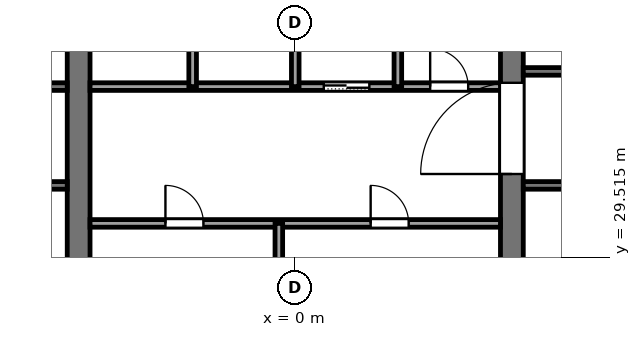
"""IFC4 building model, lengths in metres.
Left out: names, types, materials, properties, quantities, classifications, styles, units other than length and angle.
Written with IfcOpenShell. Run it as: python <this file> out.ifc"""

import sys

from ifc_helpers import new_model, si_unit, direction, frame, frame_2d, origin, place, context, subcontext, project, spatial, rectangle, extrude, element, fill, save


model = new_model("IFC4")
c1 = context("Model", 3, precision=1e-05, world=origin(), true_north=direction((0.0, 1.0)))
c2 = subcontext(c1, "Body", "Model", "MODEL_VIEW")
j1 = project(units=[si_unit("LENGTHUNIT", "METRE"), si_unit("PLANEANGLEUNIT", "RADIAN")], contexts=[c1])
p1 = place(None, origin())
s1 = spatial("IfcSite", under=j1, at=p1, CompositionType="ELEMENT")
p2 = place(p1, origin())
s2 = spatial("IfcBuilding", under=s1, at=p2, CompositionType="ELEMENT")
p3 = place(p2, frame((0.0, 0.0, 202.0)))
s3 = spatial("IfcBuildingStorey", under=s2, at=p3, CompositionType="ELEMENT", Elevation=202.0)
p4 = place(p3, frame((-5.7, 18.4, -0.13), z_axis=(0.0, 0.0, 1.0), x_axis=(0.0, 1.0, 0.0)))
e1 = element("IfcWall", 1, at=p4, inside=s3, PredefinedType="SHEAR", context=c2, shape_type="SweptSolid", body=[
    extrude(rectangle(XDim=19.2, YDim=0.6, at=frame_2d((9.6, 0.0))), origin(), (0.0, 0.0, 1.0), 4.0),
])
p5 = place(p4, frame((8.35, 0.0, 0.13)))
e2 = element("IfcOpeningElement", 2, at=p5, cuts=e1, PredefinedType="OPENING", context=c2, shape_type="SweptSolid", body=[
    extrude(rectangle(XDim=0.9, YDim=2.1, at=frame_2d((0.45, 1.05))), frame((0.0, 0.31, 0.0), z_axis=(0.0, -1.0, 0.0), x_axis=(1.0, 0.0, 0.0)), (0.0, 0.0, 1.0), 0.62),
])
p6 = place(p3, frame((5.7, 18.4, -0.13), z_axis=(0.0, 0.0, 1.0), x_axis=(0.0, 1.0, 0.0)))
e3 = element("IfcWall", 3, at=p6, inside=s3, PredefinedType="SHEAR", context=c2, shape_type="SweptSolid", body=[
    extrude(rectangle(XDim=19.2, YDim=0.6, at=frame_2d((9.6, 0.0))), origin(), (0.0, 0.0, 1.0), 4.0),
])
p7 = place(p6, frame((8.35, 0.0, 0.13)))
e4 = element("IfcOpeningElement", 4, at=p7, cuts=e3, PredefinedType="OPENING", context=c2, shape_type="SweptSolid", body=[
    extrude(rectangle(XDim=0.9, YDim=2.1, at=frame_2d((0.45, 1.05))), frame((0.0, 0.31, 0.0), z_axis=(0.0, -1.0, 0.0), x_axis=(1.0, 0.0, 0.0)), (0.0, 0.0, 1.0), 0.62),
])
p8 = place(p6, frame((13.3, 0.0, 0.13)))
e5 = element("IfcOpeningElement", 5, at=p8, cuts=e3, PredefinedType="OPENING", context=c2, shape_type="SweptSolid", body=[
    extrude(rectangle(XDim=2.4, YDim=2.4, at=frame_2d((1.2, 1.2))), frame((0.0, 0.31, 0.0), z_axis=(0.0, -1.0, 0.0), x_axis=(1.0, 0.0, 0.0)), (0.0, 0.0, 1.0), 0.62),
])
p9 = place(p3, frame((-5.4, 30.4, 0.0), z_axis=(0.0, 0.0, 1.0), x_axis=(1.0, 0.0, 0.0)))
e6 = element("IfcWall", 6, at=p9, inside=s3, PredefinedType="PARTITIONING", context=c2, shape_type="SweptSolid", body=[
    extrude(rectangle(XDim=10.8, YDim=0.2, at=frame_2d((5.4, 0.0))), origin(), (0.0, 0.0, 1.0), 3.87),
])
p10 = place(p9, frame((1.984, 0.0, 0.0)))
e7 = element("IfcOpeningElement", 7, at=p10, cuts=e6, PredefinedType="OPENING", context=c2, shape_type="SweptSolid", body=[
    extrude(rectangle(XDim=1.0, YDim=2.1, at=frame_2d((0.5, 1.05))), frame((0.0, 0.11, 0.0), z_axis=(0.0, -1.0, 0.0), x_axis=(1.0, 0.0, 0.0)), (0.0, 0.0, 1.0), 0.22),
])
p11 = place(p9, frame((7.384, 0.0, 0.0)))
e8 = element("IfcOpeningElement", 8, at=p11, cuts=e6, PredefinedType="OPENING", context=c2, shape_type="SweptSolid", body=[
    extrude(rectangle(XDim=1.0, YDim=2.1, at=frame_2d((0.5, 1.05))), frame((0.0, 0.11, 0.0), z_axis=(0.0, -1.0, 0.0), x_axis=(1.0, 0.0, 0.0)), (0.0, 0.0, 1.0), 0.22),
])
p12 = place(p3, frame((-12.6, 31.4, 0.0), z_axis=(0.0, 0.0, 1.0), x_axis=(1.0, 0.0, 0.0)))
e9 = element("IfcWall", 9, at=p12, inside=s3, PredefinedType="PARTITIONING", context=c2, shape_type="SweptSolid", body=[
    extrude(rectangle(XDim=6.6, YDim=0.2, at=frame_2d((3.3, 0.0))), origin(), (0.0, 0.0, 1.0), 3.87),
])
p13 = place(p12, frame((1.0, 0.0, 0.0)))
e10 = element("IfcOpeningElement", 10, at=p13, cuts=e9, PredefinedType="OPENING", context=c2, shape_type="SweptSolid", body=[
    extrude(rectangle(XDim=1.2, YDim=2.2, at=frame_2d((0.6, 1.1))), frame((0.0, 0.11, 0.0), z_axis=(0.0, -1.0, 0.0), x_axis=(1.0, 0.0, 0.0)), (0.0, 0.0, 1.0), 0.22),
])
p14 = place(p3, frame((6.0, 31.4, 0.0), z_axis=(0.0, 0.0, 1.0), x_axis=(1.0, 0.0, 0.0)))
e11 = element("IfcWall", 11, at=p14, inside=s3, PredefinedType="PARTITIONING", context=c2, shape_type="SweptSolid", body=[
    extrude(rectangle(XDim=6.6, YDim=0.2, at=frame_2d((3.3, 0.0))), origin(), (0.0, 0.0, 1.0), 3.87),
])
p15 = place(p3, frame((-12.6, 34.0, 0.0), z_axis=(0.0, 0.0, 1.0), x_axis=(1.0, 0.0, 0.0)))
e12 = element("IfcWall", 12, at=p15, inside=s3, PredefinedType="PARTITIONING", context=c2, shape_type="SweptSolid", body=[
    extrude(rectangle(XDim=6.6, YDim=0.2, at=frame_2d((3.3, 0.0))), origin(), (0.0, 0.0, 1.0), 3.87),
])
p16 = place(p15, frame((4.7, 0.0, 0.0)))
e13 = element("IfcOpeningElement", 13, at=p16, cuts=e12, PredefinedType="OPENING", context=c2, shape_type="SweptSolid", body=[
    extrude(rectangle(XDim=1.4, YDim=2.2, at=frame_2d((0.7, 1.1))), frame((0.0, 0.11, 0.0), z_axis=(0.0, -1.0, 0.0), x_axis=(1.0, 0.0, 0.0)), (0.0, 0.0, 1.0), 0.22),
])
p17 = place(p15, frame((2.3, 0.0, 0.0)))
e14 = element("IfcOpeningElement", 14, at=p17, cuts=e12, PredefinedType="OPENING", context=c2, shape_type="SweptSolid", body=[
    extrude(rectangle(XDim=1.4, YDim=2.2, at=frame_2d((0.7, 1.1))), frame((0.0, 0.11, 0.0), z_axis=(0.0, -1.0, 0.0), x_axis=(1.0, 0.0, 0.0)), (0.0, 0.0, 1.0), 0.22),
])
p18 = place(p15, frame((0.45, 0.0, 0.0)))
e15 = element("IfcOpeningElement", 15, at=p18, cuts=e12, PredefinedType="OPENING", context=c2, shape_type="SweptSolid", body=[
    extrude(rectangle(XDim=0.9, YDim=2.1, at=frame_2d((0.45, 1.05))), frame((0.0, 0.11, 0.0), z_axis=(0.0, -1.0, 0.0), x_axis=(1.0, 0.0, 0.0)), (0.0, 0.0, 1.0), 0.22),
])
p19 = place(p3, frame((-5.4, 34.0, 0.0), z_axis=(0.0, 0.0, 1.0), x_axis=(1.0, 0.0, 0.0)))
e16 = element("IfcWall", 16, at=p19, inside=s3, PredefinedType="PARTITIONING", context=c2, shape_type="SweptSolid", body=[
    extrude(rectangle(XDim=10.8, YDim=0.2, at=frame_2d((5.4, 0.0))), origin(), (0.0, 0.0, 1.0), 3.87),
])
p20 = place(p19, frame((6.15, 0.0, 0.0)))
e17 = element("IfcOpeningElement", 17, at=p20, cuts=e16, PredefinedType="OPENING", context=c2, shape_type="SweptSolid", body=[
    extrude(rectangle(XDim=1.2, YDim=2.2, at=frame_2d((0.6, 1.1))), frame((0.0, 0.11, 0.0), z_axis=(0.0, -1.0, 0.0), x_axis=(1.0, 0.0, 0.0)), (0.0, 0.0, 1.0), 0.22),
])
p21 = place(p19, frame((8.95, 0.0, 0.0)))
e18 = element("IfcOpeningElement", 18, at=p21, cuts=e16, PredefinedType="OPENING", context=c2, shape_type="SweptSolid", body=[
    extrude(rectangle(XDim=1.0, YDim=2.1, at=frame_2d((0.5, 1.05))), frame((0.0, 0.11, 0.0), z_axis=(0.0, -1.0, 0.0), x_axis=(1.0, 0.0, 0.0)), (0.0, 0.0, 1.0), 0.22),
])
p22 = place(p3, frame((6.0, 34.4, 0.0), z_axis=(0.0, 0.0, 1.0), x_axis=(1.0, 0.0, 0.0)))
e19 = element("IfcWall", 19, at=p22, inside=s3, PredefinedType="PARTITIONING", context=c2, shape_type="SweptSolid", body=[
    extrude(rectangle(XDim=6.6, YDim=0.2, at=frame_2d((3.3, 0.0))), origin(), (0.0, 0.0, 1.0), 3.87),
])
p23 = place(p22, frame((4.8, 0.0, 0.0)))
e20 = element("IfcOpeningElement", 20, at=p23, cuts=e19, PredefinedType="OPENING", context=c2, shape_type="SweptSolid", body=[
    extrude(rectangle(XDim=1.2, YDim=2.2, at=frame_2d((0.6, 1.1))), frame((0.0, 0.11, 0.0), z_axis=(0.0, -1.0, 0.0), x_axis=(1.0, 0.0, 0.0)), (0.0, 0.0, 1.0), 0.22),
])
p24 = place(p3, frame((-2.7, 34.0, 0.0), z_axis=(0.0, 0.0, 1.0), x_axis=(0.0, 1.0, 0.0)))
e21 = element("IfcWall", 21, at=p24, inside=s3, PredefinedType="PARTITIONING", context=c2, shape_type="SweptSolid", body=[
    extrude(rectangle(XDim=3.6, YDim=0.2, at=frame_2d((1.8, 0.0))), origin(), (0.0, 0.0, 1.0), 3.87),
])
p25 = place(p3, frame((-0.432, 28.0, 0.0), z_axis=(0.0, 0.0, 1.0), x_axis=(0.0, 1.0, 0.0)))
e22 = element("IfcWall", 22, at=p25, inside=s3, PredefinedType="PARTITIONING", context=c2, shape_type="SweptSolid", body=[
    extrude(rectangle(XDim=2.4, YDim=0.2, at=frame_2d((1.2, 0.0))), origin(), (0.0, 0.0, 1.0), 3.87),
])
for number, where, z_axis, x_axis in (
    (23, (0.0, 34.0, 0.0), (0.0, 0.0, 1.0), (0.0, 1.0, 0.0)),
    (24, (2.7, 34.0, 0.0), (0.0, 0.0, 1.0), (0.0, 1.0, 0.0)),
):
    element("IfcWall", number, at=place(p3, frame(where, z_axis=z_axis, x_axis=x_axis)), inside=s3, PredefinedType="PARTITIONING", context=c2, shape_type="SweptSolid", body=[
        extrude(rectangle(XDim=3.6, YDim=0.2, at=frame_2d((1.8, 0.0))), origin(), (0.0, 0.0, 1.0), 3.87),
    ])
p26 = place(p20, origin())
e25 = element("IfcDoor", 25, at=p26, inside=s3, OperationType="SLIDING_TO_LEFT", PredefinedType="DOOR", context=c2, shape_type="SweptSolid", body=[
    extrude(rectangle(XDim=1.2, YDim=2.2, at=frame_2d((0.6, 1.1))), frame((0.0, 0.025, 0.0), z_axis=(0.0, -1.0, 0.0), x_axis=(1.0, 0.0, 0.0)), (0.0, 0.0, 1.0), 0.05),
])
fill(e17, e25)
p27 = place(p10, origin())
e26 = element("IfcDoor", 26, at=p27, inside=s3, OperationType="SINGLE_SWING_LEFT", PredefinedType="DOOR", context=c2, shape_type="SweptSolid", body=[
    extrude(rectangle(XDim=1.0, YDim=2.1, at=frame_2d((0.5, 1.05))), frame((0.0, 0.025, 0.0), z_axis=(0.0, -1.0, 0.0), x_axis=(1.0, 0.0, 0.0)), (0.0, 0.0, 1.0), 0.05),
])
fill(e7, e26)
p28 = place(p11, origin())
e27 = element("IfcDoor", 27, at=p28, inside=s3, OperationType="SINGLE_SWING_RIGHT", PredefinedType="DOOR", context=c2, shape_type="SweptSolid", body=[
    extrude(rectangle(XDim=1.0, YDim=2.1, at=frame_2d((0.5, 1.05))), frame((0.0, 0.025, 0.0), z_axis=(0.0, -1.0, 0.0), x_axis=(1.0, 0.0, 0.0)), (0.0, 0.0, 1.0), 0.05),
])
fill(e8, e27)
p29 = place(p21, origin())
e28 = element("IfcDoor", 28, at=p29, inside=s3, OperationType="SINGLE_SWING_LEFT", PredefinedType="DOOR", context=c2, shape_type="SweptSolid", body=[
    extrude(rectangle(XDim=1.0, YDim=2.1, at=frame_2d((0.5, 1.05))), frame((0.0, 0.025, 0.0), z_axis=(0.0, -1.0, 0.0), x_axis=(1.0, 0.0, 0.0)), (0.0, 0.0, 1.0), 0.05),
])
fill(e18, e28)
p30 = place(p8, origin())
e29 = element("IfcDoor", 29, at=p30, inside=s3, OperationType="DOUBLE_DOOR_SINGLE_SWING", PredefinedType="DOOR", context=c2, shape_type="SweptSolid", body=[
    extrude(rectangle(XDim=2.4, YDim=2.4, at=frame_2d((1.2, 1.2))), frame((0.0, 0.025, 0.0), z_axis=(0.0, -1.0, 0.0), x_axis=(1.0, 0.0, 0.0)), (0.0, 0.0, 1.0), 0.05),
])
fill(e5, e29)
save(model, sys.argv[1])
